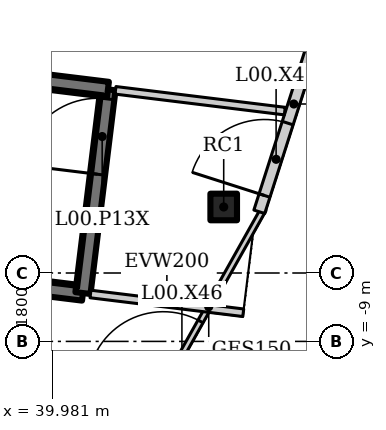
"""IFC4 building model, lengths in metres.
Left out: names, types, materials, properties, quantities, classifications, styles, units other than length and angle.
Written with IfcOpenShell. Run it as: python <this file> out.ifc"""

import sys

from ifc_helpers import new_model, si_unit, direction, frame, frame_2d, origin, origin_2d, place, context, subcontext, project, spatial, rectangle, hollow_rectangle, extrude, element, fill, save


model = new_model("IFC4")
c1 = context("Model", 3, precision=1e-05, world=origin(), true_north=direction((0.0, 1.0)))
c2 = subcontext(c1, "Body", "Model", "MODEL_VIEW")
j1 = project(units=[si_unit("LENGTHUNIT", "METRE"), si_unit("PLANEANGLEUNIT", "RADIAN")], contexts=[c1])
p1 = place(None, origin())
s1 = spatial("IfcSite", under=j1, at=p1, CompositionType="ELEMENT")
p2 = place(p1, origin())
s2 = spatial("IfcBuilding", under=s1, at=p2, CompositionType="ELEMENT")
p3 = place(p2, origin())
s3 = spatial("IfcBuildingStorey", under=s2, at=p3, CompositionType="ELEMENT", Elevation=0.0)
p4 = place(p3, frame((44.489, -5.462, 0.0), z_axis=(0.0, 0.0, 1.0), x_axis=(1.0, 0.0, 0.0)))
e1 = element("IfcColumn", 1, at=p4, inside=s3, PredefinedType="COLUMN", context=c2, shape_type="SweptSolid", body=[
    extrude(hollow_rectangle(XDim=0.7, YDim=0.7, WallThickness=0.04, at=origin_2d()), origin(), (0.0, 0.0, 1.0), 6.5),
])
p5 = place(p3, frame((42.655, -10.654, 0.0), z_axis=(0.0, 0.0, 1.0), x_axis=(0.489563544979, 0.871967622924, 0.0)))
e2 = element("IfcWall", 2, at=p5, inside=s3, PredefinedType="ELEMENTEDWALL", context=c2, shape_type="SweptSolid", body=[
    extrude(rectangle(XDim=5.883, YDim=0.15, at=frame_2d((2.941, 0.0))), origin(), (0.0, 0.0, 1.0), 6.3),
])
p6 = place(p5, frame((0.5, 0.0, 0.0)))
e3 = element("IfcOpeningElement", 3, at=p6, cuts=e2, PredefinedType="OPENING", context=c2, shape_type="SweptSolid", body=[
    extrude(rectangle(XDim=2.0, YDim=2.4, at=frame_2d((1.0, 1.2))), frame((0.0, 0.085, 0.0), z_axis=(0.0, -1.0, 0.0), x_axis=(1.0, 0.0, 0.0)), (0.0, 0.0, 1.0), 0.17),
])
p7 = place(p3, frame((45.425, -5.589, 0.0), z_axis=(0.0, 0.0, 1.0), x_axis=(0.304991367091, 0.95235511549, 0.0)))
e4 = element("IfcWall", 4, at=p7, inside=s3, PredefinedType="SOLIDWALL", context=c2, shape_type="SweptSolid", body=[
    extrude(rectangle(XDim=5.956, YDim=0.3, at=frame_2d((2.978, 0.0))), origin(), (0.0, 0.0, 1.0), 6.3),
])
p8 = place(p7, frame((0.45, 0.0, 0.0)))
e5 = element("IfcOpeningElement", 5, at=p8, cuts=e4, PredefinedType="OPENING", context=c2, shape_type="SweptSolid", body=[
    extrude(rectangle(XDim=2.0, YDim=2.1, at=frame_2d((1.0, 1.05))), frame((0.0, 0.16, 0.0), z_axis=(0.0, -1.0, 0.0), x_axis=(1.0, 0.0, 0.0)), (0.0, 0.0, 1.0), 0.32),
])
p9 = place(p3, frame((40.983, -7.752, 0.0), z_axis=(0.0, 0.0, 1.0), x_axis=(0.992543583225, -0.121890259659, 0.0)))
e6 = element("IfcWall", 6, at=p9, inside=s3, PredefinedType="SOLIDWALL", context=c2, shape_type="SweptSolid", body=[
    extrude(rectangle(XDim=4.05, YDim=0.2, at=frame_2d((2.025, 0.0))), origin(), (0.0, 0.0, 1.0), 6.3),
])
p10 = place(p3, frame((41.642, -2.393, 0.0), z_axis=(0.0, 0.0, 1.0), x_axis=(0.992546688155, -0.12186497377, 0.0)))
e7 = element("IfcWall", 7, at=p10, inside=s3, PredefinedType="SOLIDWALL", context=c2, shape_type="SweptSolid", body=[
    extrude(rectangle(XDim=4.488, YDim=0.2, at=frame_2d((2.244, 0.0))), origin(), (0.0, 0.0, 1.0), 6.3),
])
p11 = place(p3, frame((32.051, -6.656, 0.0), z_axis=(0.0, 0.0, 1.0), x_axis=(0.992545280606, -0.121876437212, 0.0)))
e8 = element("IfcWall", 8, at=p11, inside=s3, PredefinedType="SHEAR", context=c2, shape_type="SweptSolid", body=[
    extrude(rectangle(XDim=8.8, YDim=0.4, at=frame_2d((4.4, 0.0))), origin(), (0.0, 0.0, 1.0), 6.5),
])
p12 = place(p3, frame((40.785, -7.728, 0.0), z_axis=(0.0, 0.0, 1.0), x_axis=(0.121892082937, 0.992543359314, 0.0)))
e9 = element("IfcWall", 9, at=p12, inside=s3, PredefinedType="SHEAR", context=c2, shape_type="SweptSolid", body=[
    extrude(rectangle(XDim=5.4, YDim=0.4, at=frame_2d((2.7, 0.0))), origin(), (0.0, 0.0, 1.0), 6.5),
])
p13 = place(p12, frame((3.15, 0.0, 0.0)))
e10 = element("IfcOpeningElement", 10, at=p13, cuts=e9, PredefinedType="OPENING", context=c2, shape_type="SweptSolid", body=[
    extrude(rectangle(XDim=2.0, YDim=2.1, at=frame_2d((1.0, 1.05))), frame((0.0, 0.21, 0.0), z_axis=(0.0, -1.0, 0.0), x_axis=(1.0, 0.0, 0.0)), (0.0, 0.0, 1.0), 0.42),
])
p14 = place(p3, frame((41.443, -2.368, 0.0), z_axis=(0.0, 0.0, 1.0), x_axis=(-0.992545692684, 0.121873081252, 0.0)))
e11 = element("IfcWall", 11, at=p14, inside=s3, PredefinedType="SHEAR", context=c2, shape_type="SweptSolid", body=[
    extrude(rectangle(XDim=8.8, YDim=0.4, at=frame_2d((4.4, 0.0))), origin(), (0.0, 0.0, 1.0), 6.5),
])
p15 = place(p6, origin())
e12 = element("IfcDoor", 12, at=p15, inside=s3, OperationType="DOUBLE_DOOR_DOUBLE_SWING", PredefinedType="DOOR", context=c2, shape_type="SweptSolid", body=[
    extrude(rectangle(XDim=2.0, YDim=2.4, at=frame_2d((1.0, 1.2))), frame((0.0, 0.025, 0.0), z_axis=(0.0, -1.0, 0.0), x_axis=(1.0, 0.0, 0.0)), (0.0, 0.0, 1.0), 0.05),
])
fill(e3, e12)
p16 = place(p8, origin())
e13 = element("IfcDoor", 13, at=p16, inside=s3, OperationType="DOUBLE_DOOR_DOUBLE_SWING", PredefinedType="DOOR", context=c2, shape_type="SweptSolid", body=[
    extrude(rectangle(XDim=2.0, YDim=2.1, at=frame_2d((1.0, 1.05))), frame((0.0, 0.025, 0.0), z_axis=(0.0, -1.0, 0.0), x_axis=(1.0, 0.0, 0.0)), (0.0, 0.0, 1.0), 0.05),
])
fill(e5, e13)
p17 = place(p13, origin())
e14 = element("IfcDoor", 14, at=p17, inside=s3, OperationType="DOUBLE_DOOR_DOUBLE_SWING", PredefinedType="DOOR", context=c2, shape_type="SweptSolid", body=[
    extrude(rectangle(XDim=2.0, YDim=2.1, at=frame_2d((1.0, 1.05))), frame((0.0, 0.025, 0.0), z_axis=(0.0, -1.0, 0.0), x_axis=(1.0, 0.0, 0.0)), (0.0, 0.0, 1.0), 0.05),
])
fill(e10, e14)
save(model, sys.argv[1])
